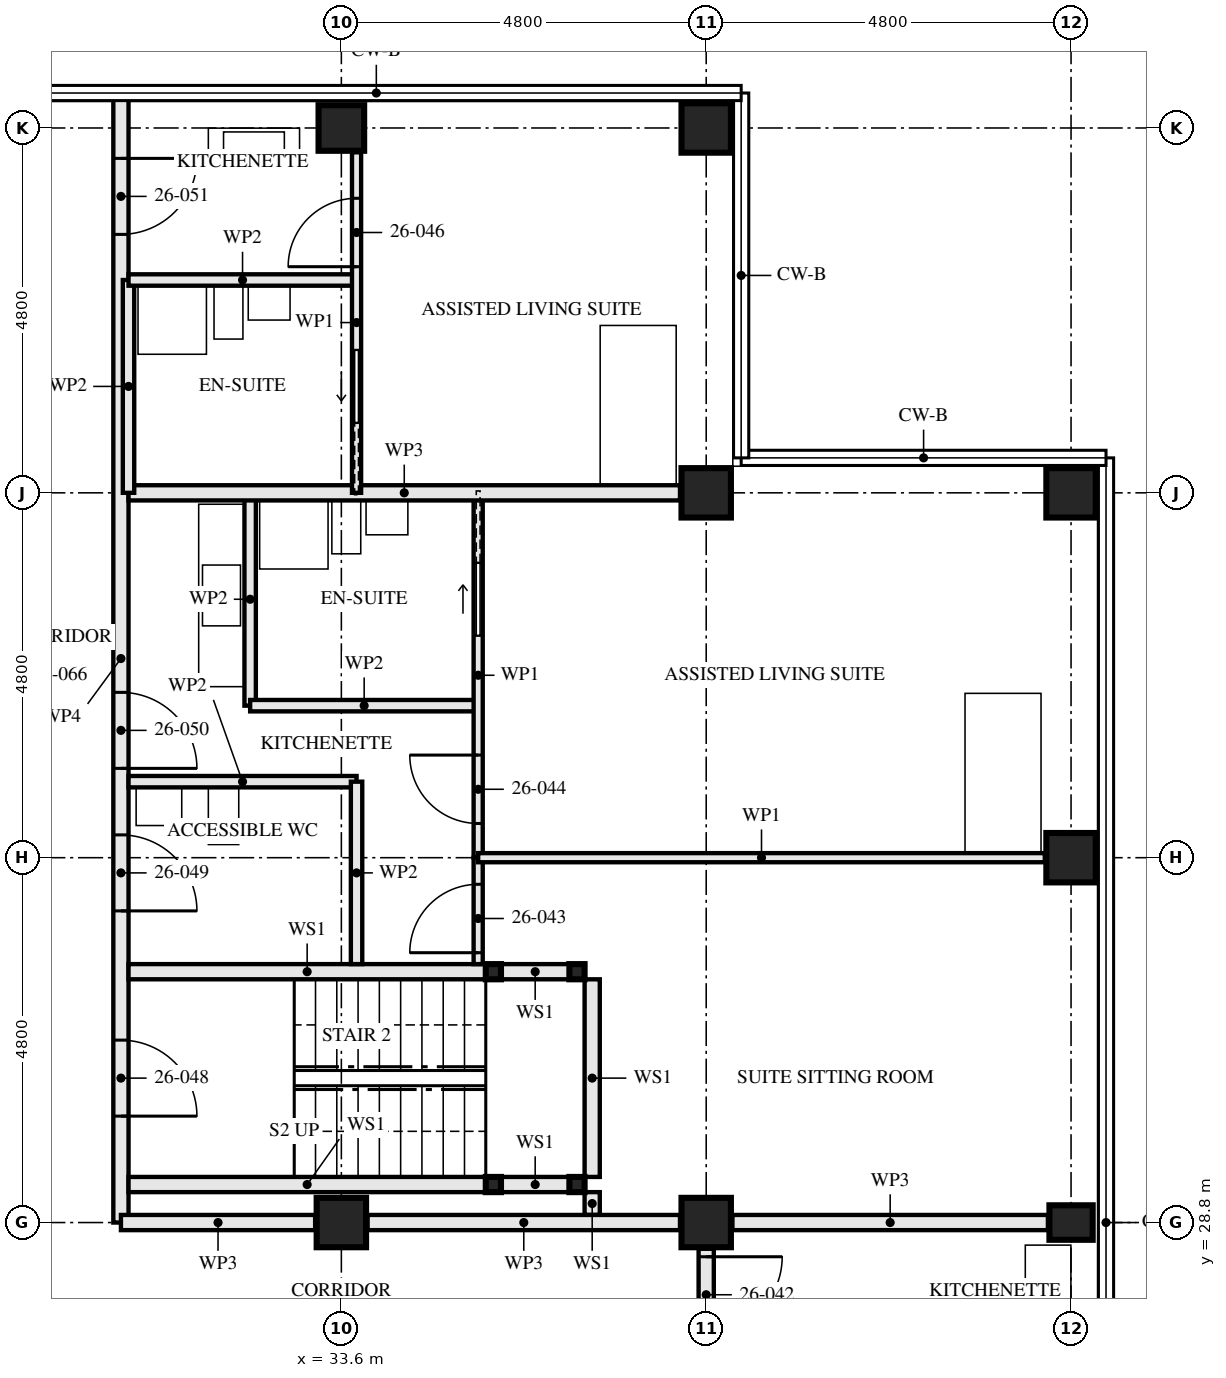
"""IFC4 building model, lengths in metres.
Left out: names, types, materials, properties, quantities, classifications, styles, units other than length and angle.
Written with IfcOpenShell. Run it as: python <this file> out.ifc"""

import sys

from ifc_helpers import new_model, si_unit, direction, frame, frame_2d, origin, origin_2d, place, context, subcontext, project, spatial, rectangle, hollow_rectangle, i_section, extrude, element, fill, save


model = new_model("IFC4")
c1 = context("Model", 3, precision=1e-05, world=origin(), true_north=direction((0.0, 1.0)))
c2 = subcontext(c1, "Body", "Model", "MODEL_VIEW")
j1 = project(units=[si_unit("LENGTHUNIT", "METRE"), si_unit("PLANEANGLEUNIT", "RADIAN")], contexts=[c1])
p1 = place(None, origin())
s1 = spatial("IfcSite", under=j1, at=p1, CompositionType="ELEMENT")
p2 = place(p1, origin())
s2 = spatial("IfcBuilding", under=s1, at=p2, CompositionType="ELEMENT")
p3 = place(p2, frame((0.0, 0.0, 98.0)))
s3 = spatial("IfcBuildingStorey", under=s2, at=p3, CompositionType="ELEMENT", Elevation=98.0)
p4 = place(p3, frame((33.6, 28.8, 0.0), z_axis=(0.0, 0.0, 1.0), x_axis=(0.0, 1.0, 0.0)))
e1 = element("IfcColumn", 1, at=p4, inside=s3, PredefinedType="COLUMN", context=c2, shape_type="SweptSolid", body=[
    extrude(hollow_rectangle(XDim=0.65, YDim=0.65, WallThickness=0.05, at=origin_2d()), origin(), (0.0, 0.0, 1.0), 3.5),
])
p5 = place(p3, frame((33.6, 43.2, 0.0), z_axis=(0.0, 0.0, 1.0), x_axis=(0.0, 1.0, 0.0)))
e2 = element("IfcColumn", 2, at=p5, inside=s3, PredefinedType="COLUMN", context=c2, shape_type="SweptSolid", body=[
    extrude(hollow_rectangle(XDim=0.6, YDim=0.6, WallThickness=0.08, at=origin_2d()), origin(), (0.0, 0.0, 1.0), 3.5),
])
p6 = place(p3, frame((38.4, 28.8, 0.0), z_axis=(0.0, 0.0, 1.0), x_axis=(0.0, 1.0, 0.0)))
e3 = element("IfcColumn", 3, at=p6, inside=s3, PredefinedType="COLUMN", context=c2, shape_type="SweptSolid", body=[
    extrude(hollow_rectangle(XDim=0.65, YDim=0.65, WallThickness=0.05, at=origin_2d()), origin(), (0.0, 0.0, 1.0), 3.5),
])
for number, where, z_axis, x_axis in (
    (4, (38.4, 38.4, 0.0), (0.0, 0.0, 1.0), (0.0, 1.0, 0.0)),
    (5, (38.4, 43.2, 0.0), (0.0, 0.0, 1.0), (0.0, 1.0, 0.0)),
):
    element("IfcColumn", number, at=place(p3, frame(where, z_axis=z_axis, x_axis=x_axis)), inside=s3, PredefinedType="COLUMN", context=c2, shape_type="SweptSolid", body=[
        extrude(hollow_rectangle(XDim=0.65, YDim=0.65, WallThickness=0.08, at=origin_2d()), origin(), (0.0, 0.0, 1.0), 3.5),
    ])
p7 = place(p3, frame((43.2, 28.8, 0.0), z_axis=(0.0, 0.0, 1.0), x_axis=(0.0, 1.0, 0.0)))
e6 = element("IfcColumn", 6, at=p7, inside=s3, PredefinedType="COLUMN", context=c2, shape_type="SweptSolid", body=[
    extrude(i_section(OverallWidth=0.454, OverallDepth=0.569, WebThickness=0.078, FlangeThickness=0.125, FilletRadius=0.015, at=origin_2d()), origin(), (0.0, 0.0, 1.0), 3.5),
])
for number, where, z_axis, x_axis in (
    (7, (43.2, 33.6, 0.0), (0.0, 0.0, 1.0), (1.0, 0.0, 0.0)),
    (8, (43.2, 38.4, 0.0), (0.0, 0.0, 1.0), (0.0, 1.0, 0.0)),
):
    element("IfcColumn", number, at=place(p3, frame(where, z_axis=z_axis, x_axis=x_axis)), inside=s3, PredefinedType="COLUMN", context=c2, shape_type="SweptSolid", body=[
        extrude(hollow_rectangle(XDim=0.65, YDim=0.65, WallThickness=0.08, at=origin_2d()), origin(), (0.0, 0.0, 1.0), 3.5),
    ])
for number, where, z_axis, x_axis in (
    (9, (36.7, 29.3, 0.0), (0.0, 0.0, 1.0), (1.0, 0.0, 0.0)),
    (10, (36.7, 32.1, 0.0), (0.0, 0.0, 1.0), (1.0, 0.0, 0.0)),
    (11, (35.6, 29.3, 0.0), (0.0, 0.0, 1.0), (1.0, 0.0, 0.0)),
    (12, (35.6, 32.1, 0.0), (0.0, 0.0, 1.0), (1.0, 0.0, 0.0)),
):
    element("IfcColumn", number, at=place(p3, frame(where, z_axis=z_axis, x_axis=x_axis)), inside=s3, PredefinedType="COLUMN", context=c2, shape_type="SweptSolid", body=[
        extrude(hollow_rectangle(XDim=0.2, YDim=0.2, WallThickness=0.008, at=origin_2d()), origin(), (0.0, 0.0, 1.0), 3.33),
    ])
p8 = place(p3, frame((38.4, 26.8, 0.0), z_axis=(0.0, 0.0, 1.0), x_axis=(0.0, 1.0, 0.0)))
e13 = element("IfcWall", 13, at=p8, inside=s3, PredefinedType="PARTITIONING", context=c2, shape_type="SweptSolid", body=[
    extrude(rectangle(XDim=1.655, YDim=0.2, at=frame_2d((0.828, 0.0))), origin(), (0.0, 0.0, 1.0), 3.33),
])
p9 = place(p8, frame((0.55, 0.0, 0.0)))
e14 = element("IfcOpeningElement", 14, at=p9, cuts=e13, PredefinedType="OPENING", context=c2, shape_type="SweptSolid", body=[
    extrude(rectangle(XDim=1.0, YDim=2.1, at=frame_2d((0.5, 1.05))), frame((0.0, 0.111, 0.0), z_axis=(0.0, -1.0, 0.0), x_axis=(1.0, 0.0, 0.0)), (0.0, 0.0, 1.0), 0.221),
])
p10 = place(p3, frame((36.6, 29.3, 0.0), z_axis=(0.0, 0.0, 1.0), x_axis=(-1.0, 0.0, 0.0)))
e15 = element("IfcWall", 15, at=p10, inside=s3, PredefinedType="SOLIDWALL", context=c2, shape_type="SweptSolid", body=[
    extrude(rectangle(XDim=0.9, YDim=0.2, at=frame_2d((0.45, 0.0))), origin(), (0.0, 0.0, 1.0), 2.99),
])
p11 = place(p3, frame((35.5, 29.3, 0.0), z_axis=(0.0, 0.0, 1.0), x_axis=(-1.0, 0.0, 0.0)))
e16 = element("IfcWall", 16, at=p11, inside=s3, PredefinedType="SOLIDWALL", context=c2, shape_type="SweptSolid", body=[
    extrude(rectangle(XDim=4.7, YDim=0.2, at=frame_2d((2.35, 0.0))), origin(), (0.0, 0.0, 1.0), 2.99),
])
p12 = place(p3, frame((36.6, 32.1, 0.0), z_axis=(0.0, 0.0, 1.0), x_axis=(-1.0, 0.0, 0.0)))
e17 = element("IfcWall", 17, at=p12, inside=s3, PredefinedType="SOLIDWALL", context=c2, shape_type="SweptSolid", body=[
    extrude(rectangle(XDim=0.9, YDim=0.2, at=frame_2d((0.45, 0.0))), origin(), (0.0, 0.0, 1.0), 2.99),
])
p13 = place(p3, frame((35.5, 32.1, 0.0), z_axis=(0.0, 0.0, 1.0), x_axis=(-1.0, 0.0, 0.0)))
e18 = element("IfcWall", 18, at=p13, inside=s3, PredefinedType="SOLIDWALL", context=c2, shape_type="SweptSolid", body=[
    extrude(rectangle(XDim=4.7, YDim=0.2, at=frame_2d((2.35, 0.0))), origin(), (0.0, 0.0, 1.0), 2.99),
])
p14 = place(p3, frame((36.9, 28.9, 0.0), z_axis=(0.0, 0.0, 1.0), x_axis=(0.0, 1.0, 0.0)))
e19 = element("IfcWall", 19, at=p14, inside=s3, PredefinedType="SOLIDWALL", context=c2, shape_type="SweptSolid", body=[
    extrude(rectangle(XDim=0.3, YDim=0.2, at=frame_2d((0.15, 0.0))), origin(), (0.0, 0.0, 1.0), 3.33),
])
p15 = place(p3, frame((36.9, 29.4, 0.0), z_axis=(0.0, 0.0, 1.0), x_axis=(0.0, 1.0, 0.0)))
e20 = element("IfcWall", 20, at=p15, inside=s3, PredefinedType="SOLIDWALL", context=c2, shape_type="SweptSolid", body=[
    extrude(rectangle(XDim=2.6, YDim=0.2, at=frame_2d((1.3, 0.0))), origin(), (0.0, 0.0, 1.0), 3.33),
])
p16 = place(p3, frame((33.8, 32.2, 0.0), z_axis=(0.0, 0.0, 1.0), x_axis=(0.0, 1.0, 0.0)))
e21 = element("IfcWall", 21, at=p16, inside=s3, PredefinedType="PARTITIONING", context=c2, shape_type="SweptSolid", body=[
    extrude(rectangle(XDim=2.4, YDim=0.15, at=frame_2d((1.2, 0.0))), origin(), (0.0, 0.0, 1.0), 2.55),
])
for number, where, z_axis, x_axis in (
    (22, (33.8, 34.6, 0.0), (0.0, 0.0, 1.0), (-1.0, 0.0, 0.0)),
    (23, (35.4, 35.6, 0.0), (0.0, 0.0, 1.0), (-1.0, 0.0, 0.0)),
):
    element("IfcWall", number, at=place(p3, frame(where, z_axis=z_axis, x_axis=x_axis)), inside=s3, PredefinedType="PARTITIONING", context=c2, shape_type="SweptSolid", body=[
        extrude(rectangle(XDim=3.0, YDim=0.15, at=frame_2d((1.5, 0.0))), origin(), (0.0, 0.0, 1.0), 3.33),
    ])
p17 = place(p3, frame((32.4, 35.6, 0.0), z_axis=(0.0, 0.0, 1.0), x_axis=(0.0, 1.0, 0.0)))
e24 = element("IfcWall", 24, at=p17, inside=s3, PredefinedType="PARTITIONING", context=c2, shape_type="SweptSolid", body=[
    extrude(rectangle(XDim=2.8, YDim=0.15, at=frame_2d((1.4, 0.0))), origin(), (0.0, 0.0, 1.0), 3.33),
])
p18 = place(p3, frame((35.4, 32.2, 0.0), z_axis=(0.0, 0.0, 1.0), x_axis=(0.0, 1.0, 0.0)))
e25 = element("IfcWall", 25, at=p18, inside=s3, PredefinedType="PARTITIONING", context=c2, shape_type="SweptSolid", body=[
    extrude(rectangle(XDim=1.4, YDim=0.12, at=frame_2d((0.7, 0.0))), origin(), (0.0, 0.0, 1.0), 3.33),
])
p19 = place(p18, frame((0.15, 0.0, 0.0)))
e26 = element("IfcOpeningElement", 26, at=p19, cuts=e25, PredefinedType="OPENING", context=c2, shape_type="SweptSolid", body=[
    extrude(rectangle(XDim=0.9, YDim=2.1, at=frame_2d((0.45, 1.05))), frame((0.0, 0.071, 0.0), z_axis=(0.0, -1.0, 0.0), x_axis=(1.0, 0.0, 0.0)), (0.0, 0.0, 1.0), 0.141),
])
p20 = place(p3, frame((35.4, 33.6, 0.0), z_axis=(0.0, 0.0, 1.0), x_axis=(0.0, 1.0, 0.0)))
e27 = element("IfcWall", 27, at=p20, inside=s3, PredefinedType="PARTITIONING", context=c2, shape_type="SweptSolid", body=[
    extrude(rectangle(XDim=4.8, YDim=0.12, at=frame_2d((2.4, 0.0))), origin(), (0.0, 0.0, 1.0), 3.33),
])
p21 = place(p20, frame((0.45, 0.0, 0.0)))
e28 = element("IfcOpeningElement", 28, at=p21, cuts=e27, PredefinedType="OPENING", context=c2, shape_type="SweptSolid", body=[
    extrude(rectangle(XDim=0.9, YDim=2.1, at=frame_2d((0.45, 1.05))), frame((0.0, 0.071, 0.0), z_axis=(0.0, -1.0, 0.0), x_axis=(1.0, 0.0, 0.0)), (0.0, 0.0, 1.0), 0.141),
])
p22 = place(p20, frame((2.925, 0.0, 0.0)))
e29 = element("IfcOpeningElement", 29, at=p22, cuts=e27, PredefinedType="OPENING", context=c2, shape_type="SweptSolid", body=[
    extrude(rectangle(XDim=0.95, YDim=2.1, at=frame_2d((0.475, 1.05))), frame((0.0, 0.071, 0.0), z_axis=(0.0, -1.0, 0.0), x_axis=(1.0, 0.0, 0.0)), (0.0, 0.0, 1.0), 0.141),
])
p23 = place(p3, frame((42.855, 33.6, 0.0), z_axis=(0.0, 0.0, 1.0), x_axis=(-1.0, 0.0, 0.0)))
e30 = element("IfcWall", 30, at=p23, inside=s3, PredefinedType="PARTITIONING", context=c2, shape_type="SweptSolid", body=[
    extrude(rectangle(XDim=7.455, YDim=0.12, at=frame_2d((3.728, 0.0))), origin(), (0.0, 0.0, 1.0), 2.55),
])
p24 = place(p3, frame((38.055, 38.4, 0.0), z_axis=(0.0, 0.0, 1.0), x_axis=(-1.0, 0.0, 0.0)))
e31 = element("IfcWall", 31, at=p24, inside=s3, PredefinedType="PARTITIONING", context=c2, shape_type="SweptSolid", body=[
    extrude(rectangle(XDim=7.255, YDim=0.2, at=frame_2d((3.627, 0.0))), origin(), (0.0, 0.0, 1.0), 2.55),
])
p25 = place(p3, frame((33.8, 41.2, 0.0), z_axis=(0.0, 0.0, 1.0), x_axis=(-1.0, 0.0, 0.0)))
e32 = element("IfcWall", 32, at=p25, inside=s3, PredefinedType="PARTITIONING", context=c2, shape_type="SweptSolid", body=[
    extrude(rectangle(XDim=3.0, YDim=0.15, at=frame_2d((1.5, 0.0))), origin(), (0.0, 0.0, 1.0), 3.33),
])
p26 = place(p3, frame((30.8, 38.4, 0.0), z_axis=(0.0, 0.0, 1.0), x_axis=(0.0, 1.0, 0.0)))
e33 = element("IfcWall", 33, at=p26, inside=s3, PredefinedType="PARTITIONING", context=c2, shape_type="SweptSolid", body=[
    extrude(rectangle(XDim=2.8, YDim=0.15, at=frame_2d((1.4, 0.0))), origin(), (0.0, 0.0, 1.0), 3.33),
])
p27 = place(p3, frame((33.8, 38.4, 0.0), z_axis=(0.0, 0.0, 1.0), x_axis=(0.0, 1.0, 0.0)))
e34 = element("IfcWall", 34, at=p27, inside=s3, PredefinedType="PARTITIONING", context=c2, shape_type="SweptSolid", body=[
    extrude(rectangle(XDim=4.48, YDim=0.12, at=frame_2d((2.24, 0.0))), origin(), (0.0, 0.0, 1.0), 3.33),
])
p28 = place(p27, frame((2.975, 0.0, 0.0)))
e35 = element("IfcOpeningElement", 35, at=p28, cuts=e34, PredefinedType="OPENING", context=c2, shape_type="SweptSolid", body=[
    extrude(rectangle(XDim=0.9, YDim=2.1, at=frame_2d((0.45, 1.05))), frame((0.0, 0.071, 0.0), z_axis=(0.0, -1.0, 0.0), x_axis=(1.0, 0.0, 0.0)), (0.0, 0.0, 1.0), 0.141),
])
p29 = place(p27, frame((0.925, 0.0, 0.0)))
e36 = element("IfcOpeningElement", 36, at=p29, cuts=e34, PredefinedType="OPENING", context=c2, shape_type="SweptSolid", body=[
    extrude(rectangle(XDim=0.95, YDim=2.1, at=frame_2d((0.475, 1.05))), frame((0.0, 0.071, 0.0), z_axis=(0.0, -1.0, 0.0), x_axis=(1.0, 0.0, 0.0)), (0.0, 0.0, 1.0), 0.141),
])
p30 = place(p3, frame((30.7, 28.8, 0.0), z_axis=(0.0, 0.0, 1.0), x_axis=(0.0, 1.0, 0.0)))
e37 = element("IfcWall", 37, at=p30, inside=s3, PredefinedType="PARTITIONING", context=c2, shape_type="SweptSolid", body=[
    extrude(rectangle(XDim=14.84, YDim=0.2, at=frame_2d((7.42, 0.0))), origin(), (0.0, 0.0, 1.0), 2.32),
])
p31 = place(p30, frame((1.4, 0.0, 0.0)))
e38 = element("IfcOpeningElement", 38, at=p31, cuts=e37, PredefinedType="OPENING", context=c2, shape_type="SweptSolid", body=[
    extrude(rectangle(XDim=1.0, YDim=2.1, at=frame_2d((0.5, 1.05))), frame((0.0, 0.111, 0.0), z_axis=(0.0, -1.0, 0.0), x_axis=(1.0, 0.0, 0.0)), (0.0, 0.0, 1.0), 0.221),
])
p32 = place(p30, frame((4.1, 0.0, 0.0)))
e39 = element("IfcOpeningElement", 39, at=p32, cuts=e37, PredefinedType="OPENING", context=c2, shape_type="SweptSolid", body=[
    extrude(rectangle(XDim=1.0, YDim=2.1, at=frame_2d((0.5, 1.05))), frame((0.0, 0.111, 0.0), z_axis=(0.0, -1.0, 0.0), x_axis=(1.0, 0.0, 0.0)), (0.0, 0.0, 1.0), 0.221),
])
p33 = place(p30, frame((5.975, 0.0, 0.0)))
e40 = element("IfcOpeningElement", 40, at=p33, cuts=e37, PredefinedType="OPENING", context=c2, shape_type="SweptSolid", body=[
    extrude(rectangle(XDim=1.0, YDim=2.1, at=frame_2d((0.5, 1.05))), frame((0.0, 0.111, 0.0), z_axis=(0.0, -1.0, 0.0), x_axis=(1.0, 0.0, 0.0)), (0.0, 0.0, 1.0), 0.221),
])
p34 = place(p30, frame((13.0, 0.0, 0.0)))
e41 = element("IfcOpeningElement", 41, at=p34, cuts=e37, PredefinedType="OPENING", context=c2, shape_type="SweptSolid", body=[
    extrude(rectangle(XDim=1.0, YDim=2.1, at=frame_2d((0.5, 1.05))), frame((0.0, 0.111, 0.0), z_axis=(0.0, -1.0, 0.0), x_axis=(1.0, 0.0, 0.0)), (0.0, 0.0, 1.0), 0.221),
])
p35 = place(p3, frame((42.896, 28.8, 0.0), z_axis=(0.0, 0.0, 1.0), x_axis=(-1.0, 0.0, 0.0)))
e42 = element("IfcWall", 42, at=p35, inside=s3, PredefinedType="PARTITIONING", context=c2, shape_type="SweptSolid", body=[
    extrude(rectangle(XDim=4.15, YDim=0.2, at=frame_2d((2.075, 0.0))), origin(), (0.0, 0.0, 1.0), 2.32),
])
p36 = place(p3, frame((38.055, 28.8, 0.0), z_axis=(0.0, 0.0, 1.0), x_axis=(-1.0, 0.0, 0.0)))
e43 = element("IfcWall", 43, at=p36, inside=s3, PredefinedType="PARTITIONING", context=c2, shape_type="SweptSolid", body=[
    extrude(rectangle(XDim=4.11, YDim=0.2, at=frame_2d((2.055, 0.0))), origin(), (0.0, 0.0, 1.0), 2.32),
])
p37 = place(p3, frame((33.255, 28.8, 0.0), z_axis=(0.0, 0.0, 1.0), x_axis=(-1.0, 0.0, 0.0)))
e44 = element("IfcWall", 44, at=p37, inside=s3, PredefinedType="PARTITIONING", context=c2, shape_type="SweptSolid", body=[
    extrude(rectangle(XDim=2.555, YDim=0.2, at=frame_2d((1.277, 0.0))), origin(), (0.0, 0.0, 1.0), 2.32),
])
p38 = place(p9, frame((1.0, 0.0, 0.0), z_axis=(0.0, 0.0, 1.0), x_axis=(-1.0, 0.0, 0.0)))
e45 = element("IfcDoor", 45, at=p38, inside=s3, OperationType="SINGLE_SWING_RIGHT", PredefinedType="DOOR", context=c2, shape_type="SweptSolid", body=[
    extrude(rectangle(XDim=1.0, YDim=2.1, at=frame_2d((0.5, 1.05))), frame((0.0, 0.027, 0.0), z_axis=(0.0, -1.0, 0.0), x_axis=(1.0, 0.0, 0.0)), (0.0, 0.0, 1.0), 0.054),
])
fill(e14, e45)
p39 = place(p19, origin())
e46 = element("IfcDoor", 46, at=p39, inside=s3, OperationType="SINGLE_SWING_RIGHT", PredefinedType="DOOR", context=c2, shape_type="SweptSolid", body=[
    extrude(rectangle(XDim=0.9, YDim=2.1, at=frame_2d((0.45, 1.05))), frame((0.0, 0.022, 0.0), z_axis=(0.0, -1.0, 0.0), x_axis=(1.0, 0.0, 0.0)), (0.0, 0.0, 1.0), 0.044),
])
fill(e26, e46)
p40 = place(p21, origin())
e47 = element("IfcDoor", 47, at=p40, inside=s3, OperationType="SINGLE_SWING_LEFT", PredefinedType="DOOR", context=c2, shape_type="SweptSolid", body=[
    extrude(rectangle(XDim=0.9, YDim=2.1, at=frame_2d((0.45, 1.05))), frame((0.0, 0.022, 0.0), z_axis=(0.0, -1.0, 0.0), x_axis=(1.0, 0.0, 0.0)), (0.0, 0.0, 1.0), 0.044),
])
fill(e28, e47)
p41 = place(p22, origin())
e48 = element("IfcDoor", 48, at=p41, inside=s3, OperationType="SLIDING_TO_LEFT", PredefinedType="DOOR", context=c2, shape_type="SweptSolid", body=[
    extrude(rectangle(XDim=0.95, YDim=2.1, at=frame_2d((0.475, 1.05))), frame((0.0, 0.022, 0.0), z_axis=(0.0, -1.0, 0.0), x_axis=(1.0, 0.0, 0.0)), (0.0, 0.0, 1.0), 0.044),
])
fill(e29, e48)
p42 = place(p28, origin())
e49 = element("IfcDoor", 49, at=p42, inside=s3, OperationType="SINGLE_SWING_RIGHT", PredefinedType="DOOR", context=c2, shape_type="SweptSolid", body=[
    extrude(rectangle(XDim=0.9, YDim=2.1, at=frame_2d((0.45, 1.05))), frame((0.0, 0.022, 0.0), z_axis=(0.0, -1.0, 0.0), x_axis=(1.0, 0.0, 0.0)), (0.0, 0.0, 1.0), 0.044),
])
fill(e35, e49)
p43 = place(p29, origin())
e50 = element("IfcDoor", 50, at=p43, inside=s3, OperationType="SLIDING_TO_RIGHT", PredefinedType="DOOR", context=c2, shape_type="SweptSolid", body=[
    extrude(rectangle(XDim=0.95, YDim=2.1, at=frame_2d((0.475, 1.05))), frame((0.0, 0.022, 0.0), z_axis=(0.0, -1.0, 0.0), x_axis=(1.0, 0.0, 0.0)), (0.0, 0.0, 1.0), 0.044),
])
fill(e36, e50)
p44 = place(p31, frame((1.0, 0.0, 0.0), z_axis=(0.0, 0.0, 1.0), x_axis=(-1.0, 0.0, 0.0)))
e51 = element("IfcDoor", 51, at=p44, inside=s3, OperationType="SINGLE_SWING_LEFT", PredefinedType="DOOR", context=c2, shape_type="SweptSolid", body=[
    extrude(rectangle(XDim=1.0, YDim=2.1, at=frame_2d((0.5, 1.05))), frame((0.0, 0.032, 0.0), z_axis=(0.0, -1.0, 0.0), x_axis=(1.0, 0.0, 0.0)), (0.0, 0.0, 1.0), 0.064),
])
fill(e38, e51)
p45 = place(p32, frame((1.0, 0.0, 0.0), z_axis=(0.0, 0.0, 1.0), x_axis=(-1.0, 0.0, 0.0)))
e52 = element("IfcDoor", 52, at=p45, inside=s3, OperationType="SINGLE_SWING_LEFT", PredefinedType="DOOR", context=c2, shape_type="SweptSolid", body=[
    extrude(rectangle(XDim=1.0, YDim=2.1, at=frame_2d((0.5, 1.05))), frame((0.0, 0.027, 0.0), z_axis=(0.0, -1.0, 0.0), x_axis=(1.0, 0.0, 0.0)), (0.0, 0.0, 1.0), 0.054),
])
fill(e39, e52)
p46 = place(p33, frame((1.0, 0.0, 0.0), z_axis=(0.0, 0.0, 1.0), x_axis=(-1.0, 0.0, 0.0)))
e53 = element("IfcDoor", 53, at=p46, inside=s3, OperationType="SINGLE_SWING_LEFT", PredefinedType="DOOR", context=c2, shape_type="SweptSolid", body=[
    extrude(rectangle(XDim=1.0, YDim=2.1, at=frame_2d((0.5, 1.05))), frame((0.0, 0.027, 0.0), z_axis=(0.0, -1.0, 0.0), x_axis=(1.0, 0.0, 0.0)), (0.0, 0.0, 1.0), 0.054),
])
fill(e40, e53)
p47 = place(p34, frame((1.0, 0.0, 0.0), z_axis=(0.0, 0.0, 1.0), x_axis=(-1.0, 0.0, 0.0)))
e54 = element("IfcDoor", 54, at=p47, inside=s3, OperationType="SINGLE_SWING_RIGHT", PredefinedType="DOOR", context=c2, shape_type="SweptSolid", body=[
    extrude(rectangle(XDim=1.0, YDim=2.1, at=frame_2d((0.5, 1.05))), frame((0.0, 0.027, 0.0), z_axis=(0.0, -1.0, 0.0), x_axis=(1.0, 0.0, 0.0)), (0.0, 0.0, 1.0), 0.054),
])
fill(e41, e54)
save(model, sys.argv[1])
